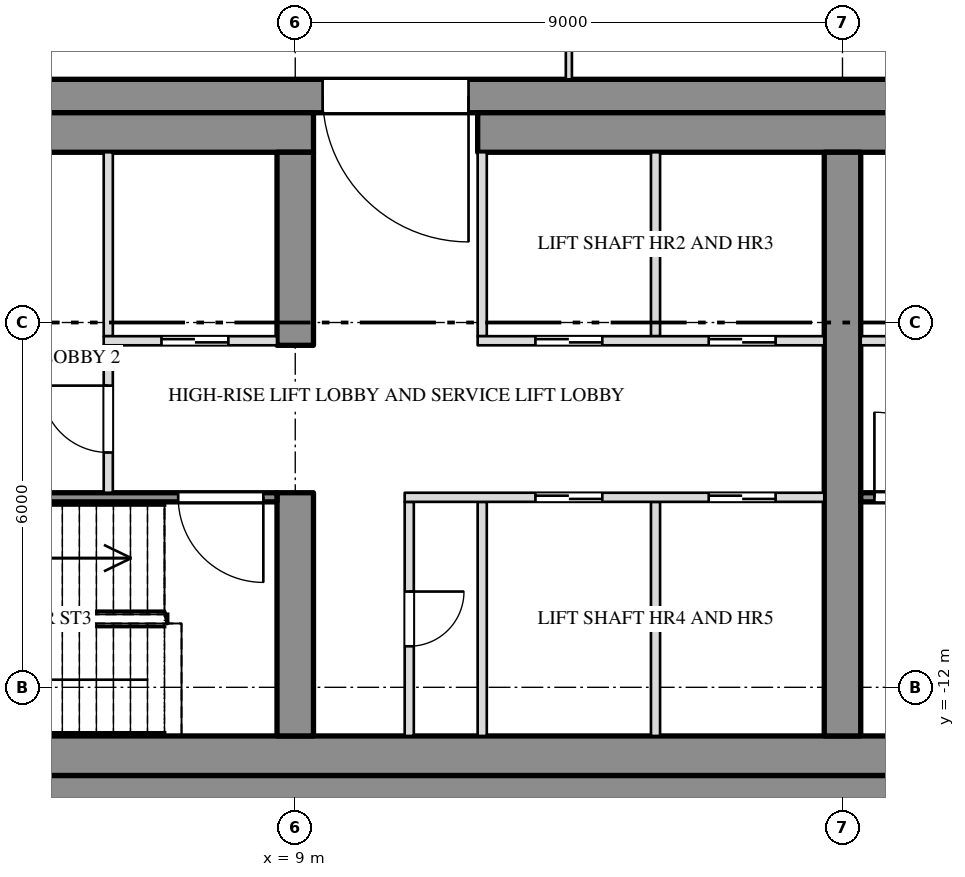
"""IFC4 building model, lengths in metres.
Left out: names, types, materials, properties, quantities, classifications, styles, units other than length and angle.
Written with IfcOpenShell. Run it as: python <this file> out.ifc"""

import sys

from ifc_helpers import new_model, si_unit, direction, frame, frame_2d, origin, place, context, subcontext, project, spatial, rectangle, extrude, element, fill, save


model = new_model("IFC4")
c1 = context("Model", 3, precision=1e-05, world=origin(), true_north=direction((0.0, 1.0)))
c2 = subcontext(c1, "Body", "Model", "MODEL_VIEW")
j1 = project(units=[si_unit("LENGTHUNIT", "METRE"), si_unit("PLANEANGLEUNIT", "RADIAN")], contexts=[c1])
p1 = place(None, origin())
s1 = spatial("IfcSite", under=j1, at=p1, CompositionType="ELEMENT")
p2 = place(p1, origin())
s2 = spatial("IfcBuilding", under=s1, at=p2, CompositionType="ELEMENT")
p3 = place(p2, frame((0.0, 0.0, 272.5)))
s3 = spatial("IfcBuildingStorey", under=s2, at=p3, CompositionType="ELEMENT", Elevation=272.5)
p4 = place(p3, frame((-27.0, -2.275, 0.0), z_axis=(0.0, 0.0, 1.0), x_axis=(1.0, 0.0, 0.0)))
e1 = element("IfcWall", 1, at=p4, inside=s3, PredefinedType="SHEAR", context=c2, shape_type="SweptSolid", body=[
    extrude(rectangle(XDim=54.0, YDim=0.55, at=frame_2d((27.0, 0.0))), origin(), (0.0, 0.0, 1.0), 3.78),
])
p5 = place(p4, frame((15.15, 0.0, 0.0)))
e2 = element("IfcOpeningElement", 2, at=p5, cuts=e1, PredefinedType="OPENING", context=c2, shape_type="SweptSolid", body=[
    extrude(rectangle(XDim=2.4, YDim=2.1, at=frame_2d((1.2, 1.05))), frame((0.0, 0.287, 0.0), z_axis=(0.0, -1.0, 0.0), x_axis=(1.0, 0.0, 0.0)), (0.0, 0.0, 1.0), 0.574),
])
p6 = place(p4, frame((36.45, 0.0, 0.0)))
e3 = element("IfcOpeningElement", 3, at=p6, cuts=e1, PredefinedType="OPENING", context=c2, shape_type="SweptSolid", body=[
    extrude(rectangle(XDim=2.4, YDim=2.1, at=frame_2d((1.2, 1.05))), frame((0.0, 0.287, 0.0), z_axis=(0.0, -1.0, 0.0), x_axis=(1.0, 0.0, 0.0)), (0.0, 0.0, 1.0), 0.574),
])
p7 = place(p3, frame((-27.0, -13.725, 0.0), z_axis=(0.0, 0.0, 1.0), x_axis=(1.0, 0.0, 0.0)))
e4 = element("IfcWall", 4, at=p7, inside=s3, PredefinedType="SHEAR", context=c2, shape_type="SweptSolid", body=[
    extrude(rectangle(XDim=54.0, YDim=0.55, at=frame_2d((27.0, 0.0))), origin(), (0.0, 0.0, 1.0), 3.78),
])
p8 = place(p3, frame((-9.3, -2.875, 0.0), z_axis=(0.0, 0.0, 1.0), x_axis=(1.0, 0.0, 0.0)))
e5 = element("IfcWall", 5, at=p8, inside=s3, PredefinedType="SHEAR", context=c2, shape_type="SweptSolid", body=[
    extrude(rectangle(XDim=18.6, YDim=0.65, at=frame_2d((9.3, 0.0))), origin(), (0.0, 0.0, 1.0), 3.78),
])
p9 = place(p3, frame((12.0, -2.875, 0.0), z_axis=(0.0, 0.0, 1.0), x_axis=(1.0, 0.0, 0.0)))
e6 = element("IfcWall", 6, at=p9, inside=s3, PredefinedType="SHEAR", context=c2, shape_type="SweptSolid", body=[
    extrude(rectangle(XDim=14.45, YDim=0.65, at=frame_2d((7.225, 0.0))), origin(), (0.0, 0.0, 1.0), 3.78),
])
p10 = place(p3, frame((-26.45, -13.125, 0.0), z_axis=(0.0, 0.0, 1.0), x_axis=(1.0, 0.0, 0.0)))
e7 = element("IfcWall", 7, at=p10, inside=s3, PredefinedType="SHEAR", context=c2, shape_type="SweptSolid", body=[
    extrude(rectangle(XDim=52.9, YDim=0.65, at=frame_2d((26.45, 0.0))), origin(), (0.0, 0.0, 1.0), 3.78),
])
p11 = place(p3, frame((9.0, -12.8, 0.0), z_axis=(0.0, 0.0, 1.0), x_axis=(0.0, 1.0, 0.0)))
e8 = element("IfcWall", 8, at=p11, inside=s3, PredefinedType="SHEAR", context=c2, shape_type="SweptSolid", body=[
    extrude(rectangle(XDim=4.0, YDim=0.6, at=frame_2d((2.0, 0.0))), origin(), (0.0, 0.0, 1.0), 3.78),
])
p12 = place(p3, frame((9.0, -6.375, 0.0), z_axis=(0.0, 0.0, 1.0), x_axis=(0.0, 1.0, 0.0)))
e9 = element("IfcWall", 9, at=p12, inside=s3, PredefinedType="SHEAR", context=c2, shape_type="SweptSolid", body=[
    extrude(rectangle(XDim=3.175, YDim=0.6, at=frame_2d((1.587, 0.0))), origin(), (0.0, 0.0, 1.0), 3.78),
])
p13 = place(p3, frame((18.0, -12.8, 0.0), z_axis=(0.0, 0.0, 1.0), x_axis=(0.0, 1.0, 0.0)))
e10 = element("IfcWall", 10, at=p13, inside=s3, PredefinedType="SHEAR", context=c2, shape_type="SweptSolid", body=[
    extrude(rectangle(XDim=9.6, YDim=0.6, at=frame_2d((4.8, 0.0))), origin(), (0.0, 0.0, 1.0), 3.78),
])
p14 = place(p3, frame((13.5, -2.0, 0.0), z_axis=(0.0, 0.0, 1.0), x_axis=(0.0, 1.0, 0.0)))
e11 = element("IfcWall", 11, at=p14, inside=s3, PredefinedType="PARTITIONING", context=c2, shape_type="SweptSolid", body=[
    extrude(rectangle(XDim=5.95, YDim=0.1, at=frame_2d((2.975, 0.0))), origin(), (0.0, 0.0, 1.0), 3.247),
])
for number, where, z_axis, x_axis in (
    (12, (5.925, -6.225, 0.0), (0.0, 0.0, 1.0), (0.0, 1.0, 0.0)),
    (13, (12.075, -6.225, 0.0), (0.0, 0.0, 1.0), (0.0, 1.0, 0.0)),
    (14, (14.925, -6.225, 0.0), (0.0, 0.0, 1.0), (0.0, 1.0, 0.0)),
):
    element("IfcWall", number, at=place(p3, frame(where, z_axis=z_axis, x_axis=x_axis)), inside=s3, PredefinedType="PARTITIONING", context=c2, shape_type="SweptSolid", body=[
        extrude(rectangle(XDim=3.025, YDim=0.15, at=frame_2d((1.513, 0.0))), origin(), (0.0, 0.0, 1.0), 3.78),
    ])
p15 = place(p3, frame((10.875, -12.8, 0.0), z_axis=(0.0, 0.0, 1.0), x_axis=(0.0, 1.0, 0.0)))
e15 = element("IfcWall", 15, at=p15, inside=s3, PredefinedType="PARTITIONING", context=c2, shape_type="SweptSolid", body=[
    extrude(rectangle(XDim=3.85, YDim=0.15, at=frame_2d((1.925, 0.0))), origin(), (0.0, 0.0, 1.0), 3.78),
])
p16 = place(p15, frame((1.475, 0.0, 0.0)))
e16 = element("IfcOpeningElement", 16, at=p16, cuts=e15, PredefinedType="OPENING", context=c2, shape_type="SweptSolid", body=[
    extrude(rectangle(XDim=0.9, YDim=2.1, at=frame_2d((0.45, 1.05))), frame((0.0, 0.087, 0.0), z_axis=(0.0, -1.0, 0.0), x_axis=(1.0, 0.0, 0.0)), (0.0, 0.0, 1.0), 0.174),
])
for number, where, z_axis, x_axis in (
    (17, (12.075, -12.8, 0.0), (0.0, 0.0, 1.0), (0.0, 1.0, 0.0)),
    (18, (14.925, -12.8, 0.0), (0.0, 0.0, 1.0), (0.0, 1.0, 0.0)),
):
    element("IfcWall", number, at=place(p3, frame(where, z_axis=z_axis, x_axis=x_axis)), inside=s3, PredefinedType="PARTITIONING", context=c2, shape_type="SweptSolid", body=[
        extrude(rectangle(XDim=3.85, YDim=0.15, at=frame_2d((1.925, 0.0))), origin(), (0.0, 0.0, 1.0), 3.78),
    ])
p17 = place(p3, frame((5.925, -8.8, 0.0), z_axis=(0.0, 0.0, 1.0), x_axis=(0.0, 1.0, 0.0)))
e19 = element("IfcWall", 19, at=p17, inside=s3, PredefinedType="PARTITIONING", context=c2, shape_type="SweptSolid", body=[
    extrude(rectangle(XDim=2.425, YDim=0.15, at=frame_2d((1.212, 0.0))), origin(), (0.0, 0.0, 1.0), 3.78),
])
p18 = place(p17, frame((0.662, 0.0, 0.0)))
e20 = element("IfcOpeningElement", 20, at=p18, cuts=e19, PredefinedType="OPENING", context=c2, shape_type="SweptSolid", body=[
    extrude(rectangle(XDim=1.1, YDim=2.1, at=frame_2d((0.55, 1.05))), frame((0.0, 0.087, 0.0), z_axis=(0.0, -1.0, 0.0), x_axis=(1.0, 0.0, 0.0)), (0.0, 0.0, 1.0), 0.174),
])
p19 = place(p3, frame((5.85, -6.3, 0.0), z_axis=(0.0, 0.0, 1.0), x_axis=(1.0, 0.0, 0.0)))
e21 = element("IfcWall", 21, at=p19, inside=s3, PredefinedType="PARTITIONING", context=c2, shape_type="SweptSolid", body=[
    extrude(rectangle(XDim=2.85, YDim=0.15, at=frame_2d((1.425, 0.0))), origin(), (0.0, 0.0, 1.0), 3.78),
])
p20 = place(p19, frame((0.95, 0.0, 0.0)))
e22 = element("IfcOpeningElement", 22, at=p20, cuts=e21, PredefinedType="OPENING", context=c2, shape_type="SweptSolid", body=[
    extrude(rectangle(XDim=1.1, YDim=2.1, at=frame_2d((0.55, 1.05))), frame((0.0, 0.087, 0.0), z_axis=(0.0, -1.0, 0.0), x_axis=(1.0, 0.0, 0.0)), (0.0, 0.0, 1.0), 0.174),
])
p21 = place(p3, frame((12.0, -6.3, 0.0), z_axis=(0.0, 0.0, 1.0), x_axis=(1.0, 0.0, 0.0)))
e23 = element("IfcWall", 23, at=p21, inside=s3, PredefinedType="PARTITIONING", context=c2, shape_type="SweptSolid", body=[
    extrude(rectangle(XDim=5.7, YDim=0.15, at=frame_2d((2.85, 0.0))), origin(), (0.0, 0.0, 1.0), 3.78),
])
p22 = place(p21, frame((0.95, 0.0, 0.0)))
e24 = element("IfcOpeningElement", 24, at=p22, cuts=e23, PredefinedType="OPENING", context=c2, shape_type="SweptSolid", body=[
    extrude(rectangle(XDim=1.1, YDim=2.1, at=frame_2d((0.55, 1.05))), frame((0.0, 0.087, 0.0), z_axis=(0.0, -1.0, 0.0), x_axis=(1.0, 0.0, 0.0)), (0.0, 0.0, 1.0), 0.174),
])
p23 = place(p21, frame((3.8, 0.0, 0.0)))
e25 = element("IfcOpeningElement", 25, at=p23, cuts=e23, PredefinedType="OPENING", context=c2, shape_type="SweptSolid", body=[
    extrude(rectangle(XDim=1.1, YDim=2.1, at=frame_2d((0.55, 1.05))), frame((0.0, 0.087, 0.0), z_axis=(0.0, -1.0, 0.0), x_axis=(1.0, 0.0, 0.0)), (0.0, 0.0, 1.0), 0.174),
])
p24 = place(p3, frame((18.3, -6.3, 0.0), z_axis=(0.0, 0.0, 1.0), x_axis=(1.0, 0.0, 0.0)))
e26 = element("IfcWall", 26, at=p24, inside=s3, PredefinedType="PARTITIONING", context=c2, shape_type="SweptSolid", body=[
    extrude(rectangle(XDim=7.5, YDim=0.15, at=frame_2d((3.75, 0.0))), origin(), (0.0, 0.0, 1.0), 3.78),
])
p25 = place(p24, frame((1.15, 0.0, 0.0)))
e27 = element("IfcOpeningElement", 27, at=p25, cuts=e26, PredefinedType="OPENING", context=c2, shape_type="SweptSolid", body=[
    extrude(rectangle(XDim=1.0, YDim=2.1, at=frame_2d((0.5, 1.05))), frame((0.0, 0.087, 0.0), z_axis=(0.0, -1.0, 0.0), x_axis=(1.0, 0.0, 0.0)), (0.0, 0.0, 1.0), 0.174),
])
p26 = place(p24, frame((3.7, 0.0, 0.0)))
e28 = element("IfcOpeningElement", 28, at=p26, cuts=e26, PredefinedType="OPENING", context=c2, shape_type="SweptSolid", body=[
    extrude(rectangle(XDim=1.0, YDim=2.1, at=frame_2d((0.5, 1.05))), frame((0.0, 0.087, 0.0), z_axis=(0.0, -1.0, 0.0), x_axis=(1.0, 0.0, 0.0)), (0.0, 0.0, 1.0), 0.174),
])
p27 = place(p24, frame((5.75, 0.0, 0.0)))
e29 = element("IfcOpeningElement", 29, at=p27, cuts=e26, PredefinedType="OPENING", context=c2, shape_type="SweptSolid", body=[
    extrude(rectangle(XDim=1.1, YDim=2.1, at=frame_2d((0.55, 1.05))), frame((0.0, 0.087, 0.0), z_axis=(0.0, -1.0, 0.0), x_axis=(1.0, 0.0, 0.0)), (0.0, 0.0, 1.0), 0.174),
])
p28 = place(p3, frame((0.3, -8.875, 0.0), z_axis=(0.0, 0.0, 1.0), x_axis=(1.0, 0.0, 0.0)))
e30 = element("IfcWall", 30, at=p28, inside=s3, PredefinedType="SHEAR", context=c2, shape_type="SweptSolid", body=[
    extrude(rectangle(XDim=8.4, YDim=0.15, at=frame_2d((4.2, 0.0))), origin(), (0.0, 0.0, 1.0), 3.78),
])
p29 = place(p28, frame((6.775, 0.0, 0.0)))
e31 = element("IfcOpeningElement", 31, at=p29, cuts=e30, PredefinedType="OPENING", context=c2, shape_type="SweptSolid", body=[
    extrude(rectangle(XDim=1.4, YDim=2.1, at=frame_2d((0.7, 1.05))), frame((0.0, 0.087, 0.0), z_axis=(0.0, -1.0, 0.0), x_axis=(1.0, 0.0, 0.0)), (0.0, 0.0, 1.0), 0.174),
])
p30 = place(p3, frame((10.8, -8.875, 0.0), z_axis=(0.0, 0.0, 1.0), x_axis=(1.0, 0.0, 0.0)))
e32 = element("IfcWall", 32, at=p30, inside=s3, PredefinedType="PARTITIONING", context=c2, shape_type="SweptSolid", body=[
    extrude(rectangle(XDim=6.9, YDim=0.15, at=frame_2d((3.45, 0.0))), origin(), (0.0, 0.0, 1.0), 3.78),
])
p31 = place(p30, frame((2.15, 0.0, 0.0)))
e33 = element("IfcOpeningElement", 33, at=p31, cuts=e32, PredefinedType="OPENING", context=c2, shape_type="SweptSolid", body=[
    extrude(rectangle(XDim=1.1, YDim=2.1, at=frame_2d((0.55, 1.05))), frame((0.0, 0.087, 0.0), z_axis=(0.0, -1.0, 0.0), x_axis=(1.0, 0.0, 0.0)), (0.0, 0.0, 1.0), 0.174),
])
p32 = place(p30, frame((5.0, 0.0, 0.0)))
e34 = element("IfcOpeningElement", 34, at=p32, cuts=e32, PredefinedType="OPENING", context=c2, shape_type="SweptSolid", body=[
    extrude(rectangle(XDim=1.1, YDim=2.1, at=frame_2d((0.55, 1.05))), frame((0.0, 0.087, 0.0), z_axis=(0.0, -1.0, 0.0), x_axis=(1.0, 0.0, 0.0)), (0.0, 0.0, 1.0), 0.174),
])
p33 = place(p3, frame((18.3, -8.875, 0.0), z_axis=(0.0, 0.0, 1.0), x_axis=(1.0, 0.0, 0.0)))
e35 = element("IfcWall", 35, at=p33, inside=s3, PredefinedType="SHEAR", context=c2, shape_type="SweptSolid", body=[
    extrude(rectangle(XDim=7.5, YDim=0.15, at=frame_2d((3.75, 0.0))), origin(), (0.0, 0.0, 1.0), 3.78),
])
p34 = place(p33, frame((0.225, 0.0, 0.0)))
e36 = element("IfcOpeningElement", 36, at=p34, cuts=e35, PredefinedType="OPENING", context=c2, shape_type="SweptSolid", body=[
    extrude(rectangle(XDim=1.4, YDim=2.1, at=frame_2d((0.7, 1.05))), frame((0.0, 0.087, 0.0), z_axis=(0.0, -1.0, 0.0), x_axis=(1.0, 0.0, 0.0)), (0.0, 0.0, 1.0), 0.174),
])
p35 = place(p18, origin())
e37 = element("IfcDoor", 37, at=p35, inside=s3, OperationType="SINGLE_SWING_RIGHT", PredefinedType="DOOR", context=c2, shape_type="SweptSolid", body=[
    extrude(rectangle(XDim=1.1, YDim=2.1, at=frame_2d((0.55, 1.05))), frame((0.0, 0.025, 0.0), z_axis=(0.0, -1.0, 0.0), x_axis=(1.0, 0.0, 0.0)), (0.0, 0.0, 1.0), 0.05),
])
fill(e20, e37)
p36 = place(p20, origin())
e38 = element("IfcDoor", 38, at=p36, inside=s3, OperationType="SLIDING_TO_RIGHT", PredefinedType="DOOR", context=c2, shape_type="SweptSolid", body=[
    extrude(rectangle(XDim=1.1, YDim=2.1, at=frame_2d((0.55, 1.05))), frame((0.0, 0.025, 0.0), z_axis=(0.0, -1.0, 0.0), x_axis=(1.0, 0.0, 0.0)), (0.0, 0.0, 1.0), 0.05),
])
fill(e22, e38)
p37 = place(p29, origin())
e39 = element("IfcDoor", 39, at=p37, inside=s3, OperationType="DOUBLE_DOOR_SINGLE_SWING", PredefinedType="DOOR", context=c2, shape_type="SweptSolid", body=[
    extrude(rectangle(XDim=1.4, YDim=2.1, at=frame_2d((0.7, 1.05))), frame((0.0, 0.025, 0.0), z_axis=(0.0, -1.0, 0.0), x_axis=(1.0, 0.0, 0.0)), (0.0, 0.0, 1.0), 0.05),
])
fill(e31, e39)
p38 = place(p6, origin())
e40 = element("IfcDoor", 40, at=p38, inside=s3, OperationType="DOUBLE_DOOR_SINGLE_SWING", PredefinedType="DOOR", context=c2, shape_type="SweptSolid", body=[
    extrude(rectangle(XDim=2.4, YDim=2.1, at=frame_2d((1.2, 1.05))), frame((0.0, 0.025, 0.0), z_axis=(0.0, -1.0, 0.0), x_axis=(1.0, 0.0, 0.0)), (0.0, 0.0, 1.0), 0.05),
])
fill(e3, e40)
p39 = place(p16, origin())
e41 = element("IfcDoor", 41, at=p39, inside=s3, OperationType="SINGLE_SWING_LEFT", PredefinedType="DOOR", context=c2, shape_type="SweptSolid", body=[
    extrude(rectangle(XDim=0.9, YDim=2.1, at=frame_2d((0.45, 1.05))), frame((0.0, 0.025, 0.0), z_axis=(0.0, -1.0, 0.0), x_axis=(1.0, 0.0, 0.0)), (0.0, 0.0, 1.0), 0.05),
])
fill(e16, e41)
p40 = place(p31, origin())
e42 = element("IfcDoor", 42, at=p40, inside=s3, OperationType="SLIDING_TO_RIGHT", PredefinedType="DOOR", context=c2, shape_type="SweptSolid", body=[
    extrude(rectangle(XDim=1.1, YDim=2.1, at=frame_2d((0.55, 1.05))), frame((0.0, 0.025, 0.0), z_axis=(0.0, -1.0, 0.0), x_axis=(1.0, 0.0, 0.0)), (0.0, 0.0, 1.0), 0.05),
])
fill(e33, e42)
p41 = place(p22, origin())
e43 = element("IfcDoor", 43, at=p41, inside=s3, OperationType="SLIDING_TO_LEFT", PredefinedType="DOOR", context=c2, shape_type="SweptSolid", body=[
    extrude(rectangle(XDim=1.1, YDim=2.1, at=frame_2d((0.55, 1.05))), frame((0.0, 0.025, 0.0), z_axis=(0.0, -1.0, 0.0), x_axis=(1.0, 0.0, 0.0)), (0.0, 0.0, 1.0), 0.05),
])
fill(e24, e43)
p42 = place(p32, origin())
e44 = element("IfcDoor", 44, at=p42, inside=s3, OperationType="SLIDING_TO_RIGHT", PredefinedType="DOOR", context=c2, shape_type="SweptSolid", body=[
    extrude(rectangle(XDim=1.1, YDim=2.1, at=frame_2d((0.55, 1.05))), frame((0.0, 0.025, 0.0), z_axis=(0.0, -1.0, 0.0), x_axis=(1.0, 0.0, 0.0)), (0.0, 0.0, 1.0), 0.05),
])
fill(e34, e44)
p43 = place(p23, origin())
e45 = element("IfcDoor", 45, at=p43, inside=s3, OperationType="SLIDING_TO_LEFT", PredefinedType="DOOR", context=c2, shape_type="SweptSolid", body=[
    extrude(rectangle(XDim=1.1, YDim=2.1, at=frame_2d((0.55, 1.05))), frame((0.0, 0.025, 0.0), z_axis=(0.0, -1.0, 0.0), x_axis=(1.0, 0.0, 0.0)), (0.0, 0.0, 1.0), 0.05),
])
fill(e25, e45)
p44 = place(p34, origin())
e46 = element("IfcDoor", 46, at=p44, inside=s3, OperationType="DOUBLE_DOOR_SINGLE_SWING", PredefinedType="DOOR", context=c2, shape_type="SweptSolid", body=[
    extrude(rectangle(XDim=1.4, YDim=2.1, at=frame_2d((0.7, 1.05))), frame((0.0, 0.025, 0.0), z_axis=(0.0, -1.0, 0.0), x_axis=(1.0, 0.0, 0.0)), (0.0, 0.0, 1.0), 0.05),
])
fill(e36, e46)
save(model, sys.argv[1])
